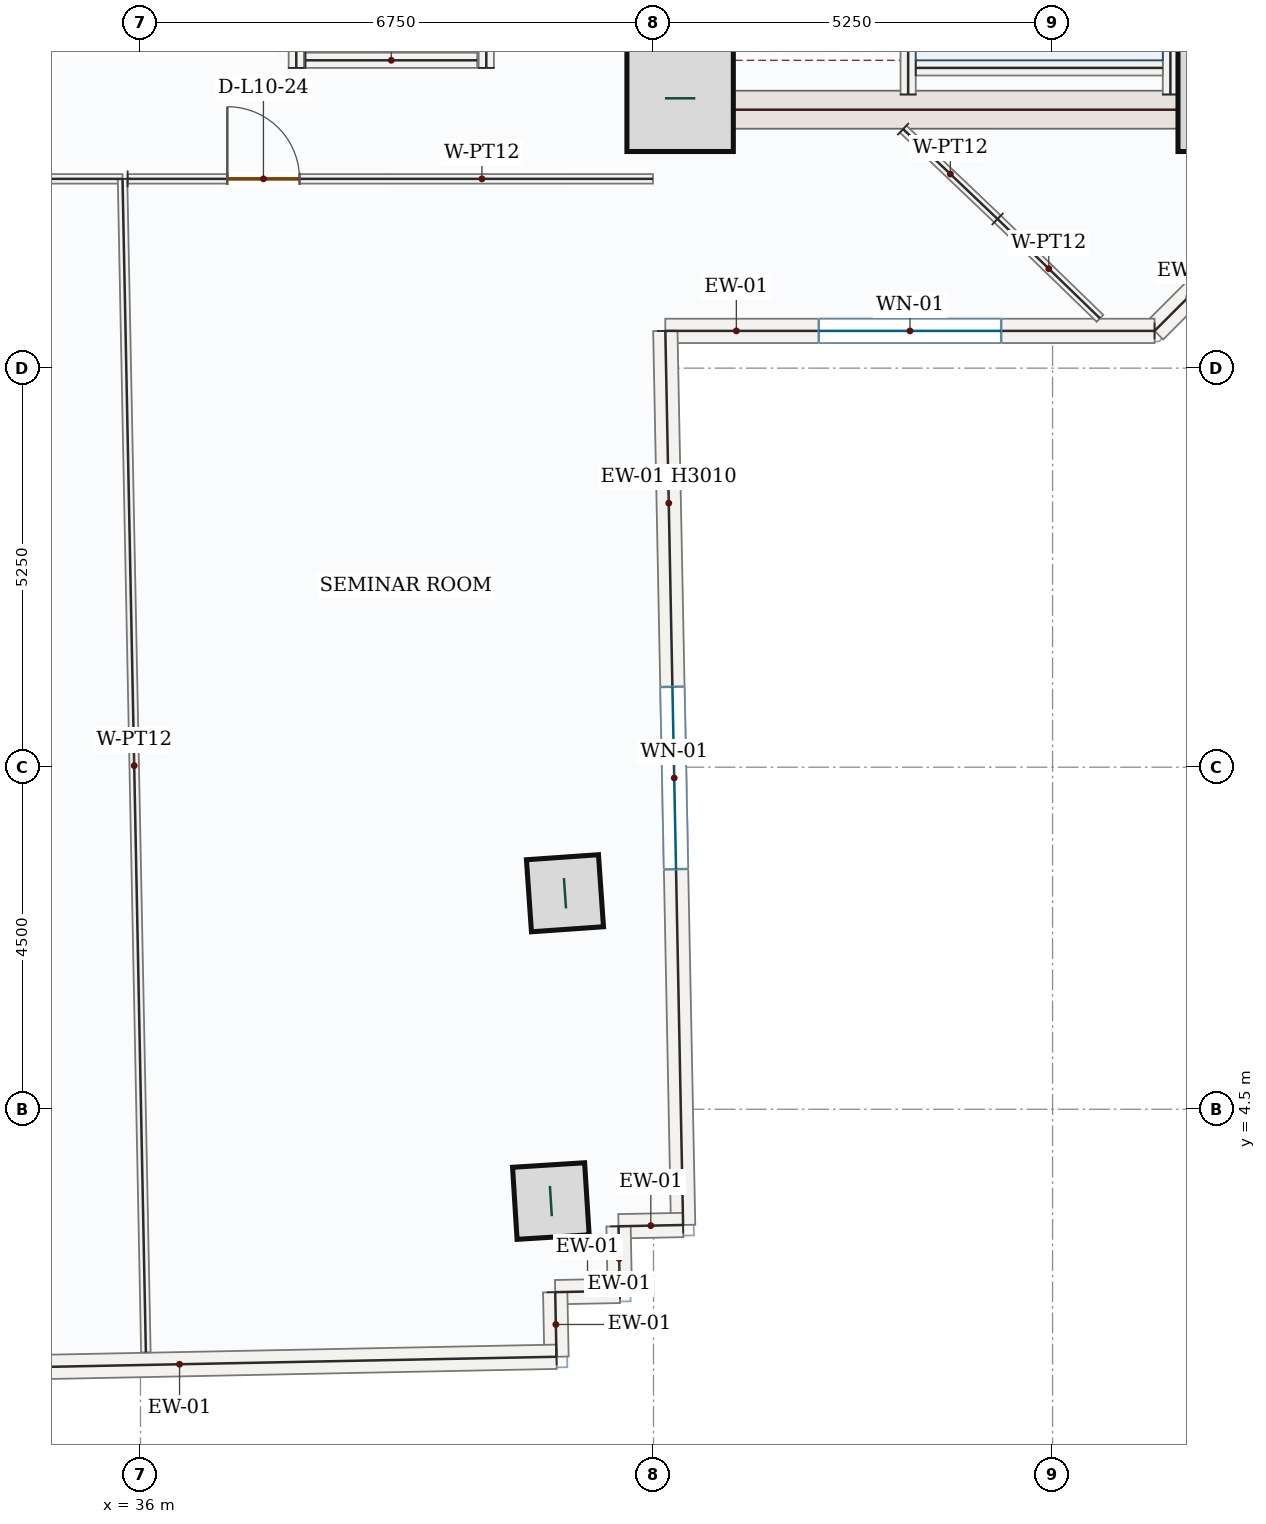
"""IFC4 building model, lengths in metres.
Left out: names, types, materials, properties, quantities, classifications, styles, units other than length and angle.
Written with IfcOpenShell. Run it as: python <this file> out.ifc"""

import sys

from ifc_helpers import new_model, si_unit, direction, frame, frame_2d, origin, origin_2d, place, context, subcontext, project, spatial, rectangle, hollow_rectangle, extrude, source, transform, mapped, element, fill, save


model = new_model("IFC4")
c1 = context("Model", 3, precision=1e-05, world=origin(), true_north=direction((0.0, 1.0)))
c2 = subcontext(c1, "Body", "Model", "MODEL_VIEW")
j1 = project(units=[si_unit("LENGTHUNIT", "METRE"), si_unit("PLANEANGLEUNIT", "RADIAN")], contexts=[c1])
p1 = place(None, origin())
s1 = spatial("IfcSite", under=j1, at=p1, CompositionType="ELEMENT")
p2 = place(p1, origin())
s2 = spatial("IfcBuilding", under=s1, at=p2, CompositionType="ELEMENT")
p3 = place(p2, frame((0.0, 0.0, 50.1)))
s3 = spatial("IfcBuildingStorey", under=s2, at=p3, CompositionType="ELEMENT", Elevation=50.1)
p4 = place(p3, frame((43.0, 17.4, 0.0), z_axis=(0.0, 0.0, 1.0), x_axis=(0.0, 1.0, 0.0)))
e1 = element("IfcWall", 1, at=p4, inside=s3, PredefinedType="SHEAR", context=c2, shape_type="SweptSolid", body=[
    extrude(rectangle(XDim=8.55, YDim=0.5, at=frame_2d((4.275, 0.0))), origin(), (0.0, 0.0, 1.0), 3.95),
])
p5 = place(p4, frame((6.65, 0.0, 0.0)))
e2 = element("IfcOpeningElement", 2, at=p5, cuts=e1, PredefinedType="OPENING", context=c2, shape_type="SweptSolid", body=[
    extrude(rectangle(XDim=1.1, YDim=2.2, at=frame_2d((0.55, 1.1))), frame((0.0, 0.26, 0.0), z_axis=(0.0, -1.0, 0.0), x_axis=(1.0, 0.0, 0.0)), (0.0, 0.0, 1.0), 0.52),
])
p6 = place(p4, frame((1.75, 0.0, 0.0)))
e3 = element("IfcOpeningElement", 3, at=p6, cuts=e1, PredefinedType="OPENING", context=c2, shape_type="SweptSolid", body=[
    extrude(rectangle(XDim=1.3, YDim=2.2, at=frame_2d((0.65, 1.1))), frame((0.0, 0.26, 0.0), z_axis=(0.0, -1.0, 0.0), x_axis=(1.0, 0.0, 0.0)), (0.0, 0.0, 1.0), 0.52),
])
p7 = place(p4, frame((4.55, 0.0, 0.0)))
e4 = element("IfcOpeningElement", 4, at=p7, cuts=e1, PredefinedType="OPENING", context=c2, shape_type="SweptSolid", body=[
    extrude(rectangle(XDim=0.88, YDim=2.1, at=frame_2d((0.44, 1.05))), frame((0.0, 0.26, 0.0), z_axis=(0.0, -1.0, 0.0), x_axis=(1.0, 0.0, 0.0)), (0.0, 0.0, 1.0), 0.52),
])
m1 = source(origin(), c2, "Body", "SweptSolid", [
    extrude(rectangle(XDim=7.0, YDim=0.5, at=frame_2d((3.5, 0.0))), origin(), (0.0, 0.0, 1.0), 3.95),
])
p8 = place(p3, frame((43.25, 17.65, 0.0), z_axis=(0.0, 0.0, 1.0), x_axis=(1.0, 0.0, 0.0)))
e5 = element("IfcWall", 5, at=p8, inside=s3, PredefinedType="SHEAR", context=c2, shape_type="MappedRepresentation", body=[
    mapped(m1, transform((0.0, 0.0, 0.0), x_axis=(1.0, 0.0, 0.0), y_axis=(0.0, 1.0, 0.0), z_axis=(0.0, 0.0, 1.0), scale=1.0)),
])
m2 = source(origin(), c2, "Body", "SweptSolid", [
    extrude(rectangle(XDim=1.4, YDim=1.4, at=origin_2d()), origin(), (0.0, 0.0, 1.0), 4.2),
])
for number, where, z_axis, x_axis in (
    (6, (43.1, 17.8, 0.0), (0.0, 0.0, 1.0), (1.0, 0.0, 0.0)),
    (7, (50.35, 17.8, 0.0), (0.0, 0.0, 1.0), (1.0, 0.0, 0.0)),
):
    element("IfcColumn", number, at=place(p3, frame(where, z_axis=z_axis, x_axis=x_axis)), inside=s3, PredefinedType="COLUMN", context=c2, shape_type="MappedRepresentation", body=[
        mapped(m2, transform((0.0, 0.0, 0.0), x_axis=(1.0, 0.0, 0.0), y_axis=(0.0, 1.0, 0.0), z_axis=(0.0, 0.0, 1.0), scale=1.0)),
    ])
m3 = source(origin(), c2, "Body", "SweptSolid", [
    extrude(hollow_rectangle(XDim=0.95, YDim=0.95, WallThickness=0.05, at=origin_2d()), origin(), (0.0, 0.0, 1.0), 4.2),
])
for number, where, z_axis, x_axis in (
    (8, (41.585, 7.342, 0.0), (0.0, 0.0, 1.0), (-0.07, 0.998, 0.0)),
    (9, (41.399, 3.292, 0.0), (0.0, 0.0, 1.0), (-0.063, 0.998, 0.0)),
):
    element("IfcColumn", number, at=place(p3, frame(where, z_axis=z_axis, x_axis=x_axis)), inside=s3, PredefinedType="COLUMN", context=c2, shape_type="MappedRepresentation", body=[
        mapped(m3, transform((0.0, 0.0, 0.0), x_axis=(1.0, 0.0, 0.0), y_axis=(0.0, 1.0, 0.0), z_axis=(0.0, 0.0, 1.0), scale=1.0)),
    ])
p9 = place(p3, frame((53.06, 18.458, 0.0), z_axis=(0.0, 0.0, 1.0), x_axis=(-0.707106781187, -0.707106781187, 0.0)))
e10 = element("IfcWall", 10, at=p9, inside=s3, PredefinedType="SOLIDWALL", context=c2, shape_type="SweptSolid", body=[
    extrude(rectangle(XDim=5.258, YDim=0.32, at=frame_2d((2.629, 0.0))), origin(), (0.0, 0.0, 1.0), 3.95),
])
p10 = place(p9, frame((1.429, 0.0, 0.85)))
e11 = element("IfcOpeningElement", 11, at=p10, cuts=e10, PredefinedType="OPENING", context=c2, shape_type="SweptSolid", body=[
    extrude(rectangle(XDim=2.4, YDim=1.8, at=frame_2d((1.2, 0.9))), frame((0.0, 0.17, 0.0), z_axis=(0.0, -1.0, 0.0), x_axis=(1.0, 0.0, 0.0)), (0.0, 0.0, 1.0), 0.34),
])
p11 = place(p3, frame((49.342, 14.74, 0.0), z_axis=(0.0, 0.0, 1.0), x_axis=(-1.0, 0.0, 0.0)))
e12 = element("IfcWall", 12, at=p11, inside=s3, PredefinedType="SOLIDWALL", context=c2, shape_type="SweptSolid", body=[
    extrude(rectangle(XDim=6.437, YDim=0.32, at=frame_2d((3.218, 0.0))), origin(), (0.0, 0.0, 1.0), 3.95),
])
p12 = place(p11, frame((2.018, 0.0, 0.85)))
e13 = element("IfcOpeningElement", 13, at=p12, cuts=e12, PredefinedType="OPENING", context=c2, shape_type="SweptSolid", body=[
    extrude(rectangle(XDim=2.4, YDim=1.8, at=frame_2d((1.2, 0.9))), frame((0.0, 0.17, 0.0), z_axis=(0.0, -1.0, 0.0), x_axis=(1.0, 0.0, 0.0)), (0.0, 0.0, 1.0), 0.34),
])
p13 = place(p3, frame((42.905, 14.74, 0.0), z_axis=(0.0, 0.0, 1.0), x_axis=(0.019900582882, -0.999801963791, 0.0)))
e14 = element("IfcWall", 14, at=p13, inside=s3, PredefinedType="SOLIDWALL", context=c2, shape_type="SweptSolid", body=[
    extrude(rectangle(XDim=11.765, YDim=0.32, at=frame_2d((5.883, 0.0))), origin(), (0.0, 0.0, 1.0), 3.01),
])
p14 = place(p13, frame((4.683, 0.0, 0.85)))
e15 = element("IfcOpeningElement", 15, at=p14, cuts=e14, PredefinedType="OPENING", context=c2, shape_type="SweptSolid", body=[
    extrude(rectangle(XDim=2.4, YDim=1.8, at=frame_2d((1.2, 0.9))), frame((0.0, 0.17, 0.0), z_axis=(0.0, -1.0, 0.0), x_axis=(1.0, 0.0, 0.0)), (0.0, 0.0, 1.0), 0.34),
])
m4 = source(origin(), c2, "Body", "SweptSolid", [
    extrude(rectangle(XDim=0.85, YDim=0.32, at=frame_2d((0.425, 0.0))), origin(), (0.0, 0.0, 1.0), 3.95),
])
for number, where, z_axis, x_axis in (
    (16, (43.139, 2.977, 0.0), (0.0, 0.0, 1.0), (-1.0, -0.02, 0.0)),
    (17, (42.29, 2.96, 0.0), (0.0, 0.0, 1.0), (0.02, -1.0, 0.0)),
    (18, (42.306, 2.111, 0.0), (0.0, 0.0, 1.0), (-1.0, -0.02, 0.0)),
):
    element("IfcWall", number, at=place(p3, frame(where, z_axis=z_axis, x_axis=x_axis)), inside=s3, PredefinedType="SOLIDWALL", context=c2, shape_type="MappedRepresentation", body=[
        mapped(m4, transform((0.0, 0.0, 0.0), x_axis=(1.0, 0.0, 0.0), y_axis=(0.0, 1.0, 0.0), z_axis=(0.0, 0.0, 1.0), scale=1.0)),
    ])
m5 = source(origin(), c2, "Body", "SweptSolid", [
    extrude(rectangle(XDim=0.85, YDim=0.32, at=frame_2d((0.425, 0.0))), origin(), (0.0, 0.0, 1.0), 3.95),
])
p15 = place(p3, frame((41.457, 2.094, 0.0), z_axis=(0.0, 0.0, 1.0), x_axis=(0.019823689915, -0.999803491351, 0.0)))
e19 = element("IfcWall", 19, at=p15, inside=s3, PredefinedType="SOLIDWALL", context=c2, shape_type="MappedRepresentation", body=[
    mapped(m5, transform((0.0, 0.0, 0.0), x_axis=(1.0, 0.0, 0.0), y_axis=(0.0, 1.0, 0.0), z_axis=(0.0, 0.0, 1.0), scale=1.0)),
])
m6 = source(origin(), c2, "Body", "SweptSolid", [
    extrude(rectangle(XDim=9.92, YDim=0.32, at=frame_2d((4.96, 0.0))), origin(), (0.0, 0.0, 1.0), 3.95),
])
p16 = place(p3, frame((41.473, 1.244, 0.0), z_axis=(0.0, 0.0, 1.0), x_axis=(-0.999801768563, -0.019910388705, 0.0)))
e20 = element("IfcWall", 20, at=p16, inside=s3, PredefinedType="SOLIDWALL", context=c2, shape_type="MappedRepresentation", body=[
    mapped(m6, transform((0.0, 0.0, 0.0), x_axis=(1.0, 0.0, 0.0), y_axis=(0.0, 1.0, 0.0), z_axis=(0.0, 0.0, 1.0), scale=1.0)),
])
m7 = source(origin(), c2, "Body", "SweptSolid", [
    extrude(rectangle(XDim=7.87, YDim=0.2, at=frame_2d((3.935, 0.0))), origin(), (0.0, 0.0, 1.0), 3.95),
])
p17 = place(p3, frame((49.55, 17.85, 0.0), z_axis=(0.0, 0.0, 1.0), x_axis=(0.0, 1.0, 0.0)))
e21 = element("IfcWall", 21, at=p17, inside=s3, PredefinedType="SOLIDWALL", context=c2, shape_type="MappedRepresentation", body=[
    mapped(m7, transform((0.0, 0.0, 0.0), x_axis=(1.0, 0.0, 0.0), y_axis=(0.0, 1.0, 0.0), z_axis=(0.0, 0.0, 1.0), scale=1.0)),
])
p18 = place(p3, frame((46.1, 17.85, 0.0), z_axis=(0.0, 0.0, 1.0), x_axis=(0.0, 1.0, 0.0)))
e22 = element("IfcWall", 22, at=p18, inside=s3, PredefinedType="SOLIDWALL", context=c2, shape_type="SweptSolid", body=[
    extrude(rectangle(XDim=8.0, YDim=0.2, at=frame_2d((4.0, 0.0))), origin(), (0.0, 0.0, 1.0), 3.95),
])
p19 = place(p18, frame((6.3, 0.0, 0.0)))
e23 = element("IfcOpeningElement", 23, at=p19, cuts=e22, PredefinedType="OPENING", context=c2, shape_type="SweptSolid", body=[
    extrude(rectangle(XDim=1.05, YDim=2.15, at=frame_2d((0.525, 1.075))), frame((0.0, 0.11, 0.0), z_axis=(0.0, -1.0, 0.0), x_axis=(1.0, 0.0, 0.0)), (0.0, 0.0, 1.0), 0.22),
])
m8 = source(origin(), c2, "Body", "SweptSolid", [
    extrude(rectangle(XDim=3.25, YDim=0.2, at=frame_2d((1.625, 0.0))), origin(), (0.0, 0.0, 1.0), 3.95),
])
p20 = place(p3, frame((46.2, 18.2, 0.0), z_axis=(0.0, 0.0, 1.0), x_axis=(1.0, 0.0, 0.0)))
e24 = element("IfcWall", 24, at=p20, inside=s3, PredefinedType="SOLIDWALL", context=c2, shape_type="MappedRepresentation", body=[
    mapped(m8, transform((0.0, 0.0, 0.0), x_axis=(1.0, 0.0, 0.0), y_axis=(0.0, 1.0, 0.0), z_axis=(0.0, 0.0, 1.0), scale=1.0)),
])
m9 = source(origin(), c2, "Body", "SweptSolid", [
    extrude(rectangle(XDim=2.35, YDim=0.2, at=frame_2d((1.175, 0.0))), origin(), (0.0, 0.0, 1.0), 3.95),
])
for number, where, z_axis, x_axis in (
    (25, (38.05, 18.2, 0.0), (0.0, 0.0, 1.0), (0.0, 1.0, 0.0)),
    (26, (40.55, 18.2, 0.0), (0.0, 0.0, 1.0), (0.0, 1.0, 0.0)),
):
    element("IfcWall", number, at=place(p3, frame(where, z_axis=z_axis, x_axis=x_axis)), inside=s3, PredefinedType="SOLIDWALL", context=c2, shape_type="MappedRepresentation", body=[
        mapped(m9, transform((0.0, 0.0, 0.0), x_axis=(1.0, 0.0, 0.0), y_axis=(0.0, 1.0, 0.0), z_axis=(0.0, 0.0, 1.0), scale=1.0)),
    ])
m10 = source(origin(), c2, "Body", "SweptSolid", [
    extrude(rectangle(XDim=2.26, YDim=0.2, at=frame_2d((1.13, 0.0))), origin(), (0.0, 0.0, 1.0), 3.95),
])
p21 = place(p3, frame((38.17, 18.3, 0.0), z_axis=(0.0, 0.0, 1.0), x_axis=(1.0, 0.0, 0.0)))
e27 = element("IfcWall", 27, at=p21, inside=s3, PredefinedType="SOLIDWALL", context=c2, shape_type="MappedRepresentation", body=[
    mapped(m10, transform((0.0, 0.0, 0.0), x_axis=(1.0, 0.0, 0.0), y_axis=(0.0, 1.0, 0.0), z_axis=(0.0, 0.0, 1.0), scale=1.0)),
])
p22 = place(p3, frame((29.258, 16.74, 0.0), z_axis=(0.0, 0.0, 1.0), x_axis=(0.999999999296, -3.7522044e-05, 0.0)))
e28 = element("IfcWall", 28, at=p22, inside=s3, PredefinedType="PARTITIONING", context=c2, shape_type="SweptSolid", body=[
    extrude(rectangle(XDim=6.507, YDim=0.125, at=frame_2d((3.253, 0.0))), origin(), (0.0, 0.0, 1.0), 3.95),
])
p23 = place(p22, frame((4.334, 0.0, 0.0)))
e29 = element("IfcOpeningElement", 29, at=p23, cuts=e28, PredefinedType="OPENING", context=c2, shape_type="SweptSolid", body=[
    extrude(rectangle(XDim=0.95, YDim=2.15, at=frame_2d((0.475, 1.075))), frame((0.0, 0.073, 0.0), z_axis=(0.0, -1.0, 0.0), x_axis=(1.0, 0.0, 0.0)), (0.0, 0.0, 1.0), 0.145),
])
m11 = source(origin(), c2, "Body", "SweptSolid", [
    extrude(rectangle(XDim=15.442, YDim=0.125, at=frame_2d((7.721, 0.0))), origin(), (0.0, 0.0, 1.0), 3.95),
])
p24 = place(p3, frame((35.764, 16.74, 0.0), z_axis=(0.0, 0.0, 1.0), x_axis=(0.01988979601, -0.999802178441, 0.0)))
e30 = element("IfcWall", 30, at=p24, inside=s3, PredefinedType="PARTITIONING", context=c2, shape_type="MappedRepresentation", body=[
    mapped(m11, transform((0.0, 0.0, 0.0), x_axis=(1.0, 0.0, 0.0), y_axis=(0.0, 1.0, 0.0), z_axis=(0.0, 0.0, 1.0), scale=1.0)),
])
p25 = place(p3, frame((35.832, 16.74, 0.0), z_axis=(0.0, 0.0, 1.0), x_axis=(0.999999999376, 3.5326951e-05, 0.0)))
e31 = element("IfcWall", 31, at=p25, inside=s3, PredefinedType="PARTITIONING", context=c2, shape_type="SweptSolid", body=[
    extrude(rectangle(XDim=6.911, YDim=0.125, at=frame_2d((3.456, 0.0))), origin(), (0.0, 0.0, 1.0), 3.95),
])
p26 = place(p25, frame((1.311, 0.0, 0.0)))
e32 = element("IfcOpeningElement", 32, at=p26, cuts=e31, PredefinedType="OPENING", context=c2, shape_type="SweptSolid", body=[
    extrude(rectangle(XDim=0.95, YDim=2.15, at=frame_2d((0.475, 1.075))), frame((0.0, 0.073, 0.0), z_axis=(0.0, -1.0, 0.0), x_axis=(1.0, 0.0, 0.0)), (0.0, 0.0, 1.0), 0.145),
])
m12 = source(origin(), c2, "Body", "SweptSolid", [
    extrude(rectangle(XDim=1.715, YDim=0.125, at=frame_2d((0.857, 0.0))), origin(), (0.0, 0.0, 1.0), 3.95),
])
p27 = place(p3, frame((46.034, 17.395, 0.0), z_axis=(0.0, 0.0, 1.0), x_axis=(0.724259786069, -0.689527201989, 0.0)))
e33 = element("IfcWall", 33, at=p27, inside=s3, PredefinedType="PARTITIONING", context=c2, shape_type="MappedRepresentation", body=[
    mapped(m12, transform((0.0, 0.0, 0.0), x_axis=(1.0, 0.0, 0.0), y_axis=(0.0, 1.0, 0.0), z_axis=(0.0, 0.0, 1.0), scale=1.0)),
])
m13 = source(origin(), c2, "Body", "SweptSolid", [
    extrude(rectangle(XDim=1.878, YDim=0.125, at=frame_2d((0.939, 0.0))), origin(), (0.0, 0.0, 1.0), 3.95),
])
p28 = place(p3, frame((47.276, 16.212, 0.0), z_axis=(0.0, 0.0, 1.0), x_axis=(0.717752688518, -0.696298124459, 0.0)))
e34 = element("IfcWall", 34, at=p28, inside=s3, PredefinedType="PARTITIONING", context=c2, shape_type="MappedRepresentation", body=[
    mapped(m13, transform((0.0, 0.0, 0.0), x_axis=(1.0, 0.0, 0.0), y_axis=(0.0, 1.0, 0.0), z_axis=(0.0, 0.0, 1.0), scale=1.0)),
])
m14 = source(origin(), c2, "Body", "SweptSolid", [
    extrude(rectangle(XDim=2.4, YDim=1.8, at=frame_2d((1.2, 0.9))), frame((0.0, 0.03, 0.0), z_axis=(0.0, -1.0, 0.0), x_axis=(1.0, 0.0, 0.0)), (0.0, 0.0, 1.0), 0.06),
])
p29 = place(p12, origin())
e35 = element("IfcWindow", 35, at=p29, inside=s3, PartitioningType="DOUBLE_PANEL_VERTICAL", PredefinedType="WINDOW", context=c2, shape_type="MappedRepresentation", body=[
    mapped(m14, transform((0.0, 0.0, 0.0), x_axis=(1.0, 0.0, 0.0), y_axis=(0.0, 1.0, 0.0), z_axis=(0.0, 0.0, 1.0), scale=1.0)),
])
fill(e13, e35)
p30 = place(p14, origin())
e36 = element("IfcWindow", 36, at=p30, inside=s3, PartitioningType="DOUBLE_PANEL_VERTICAL", PredefinedType="WINDOW", context=c2, shape_type="MappedRepresentation", body=[
    mapped(m14, transform((0.0, 0.0, 0.0), x_axis=(1.0, 0.0, 0.0), y_axis=(0.0, 1.0, 0.0), z_axis=(0.0, 0.0, 1.0), scale=1.0)),
])
fill(e15, e36)
m15 = source(origin(), c2, "Body", "SweptSolid", [
    extrude(rectangle(XDim=0.95, YDim=2.15, at=frame_2d((0.475, 1.075))), frame((0.0, 0.025, 0.0), z_axis=(0.0, -1.0, 0.0), x_axis=(1.0, 0.0, 0.0)), (0.0, 0.0, 1.0), 0.05),
])
p31 = place(p26, origin())
e37 = element("IfcDoor", 37, at=p31, inside=s3, OperationType="SINGLE_SWING_LEFT", PredefinedType="DOOR", context=c2, shape_type="MappedRepresentation", body=[
    mapped(m15, transform((0.0, 0.0, 0.0), x_axis=(1.0, 0.0, 0.0), y_axis=(0.0, 1.0, 0.0), z_axis=(0.0, 0.0, 1.0), scale=1.0)),
])
fill(e32, e37)
save(model, sys.argv[1])
